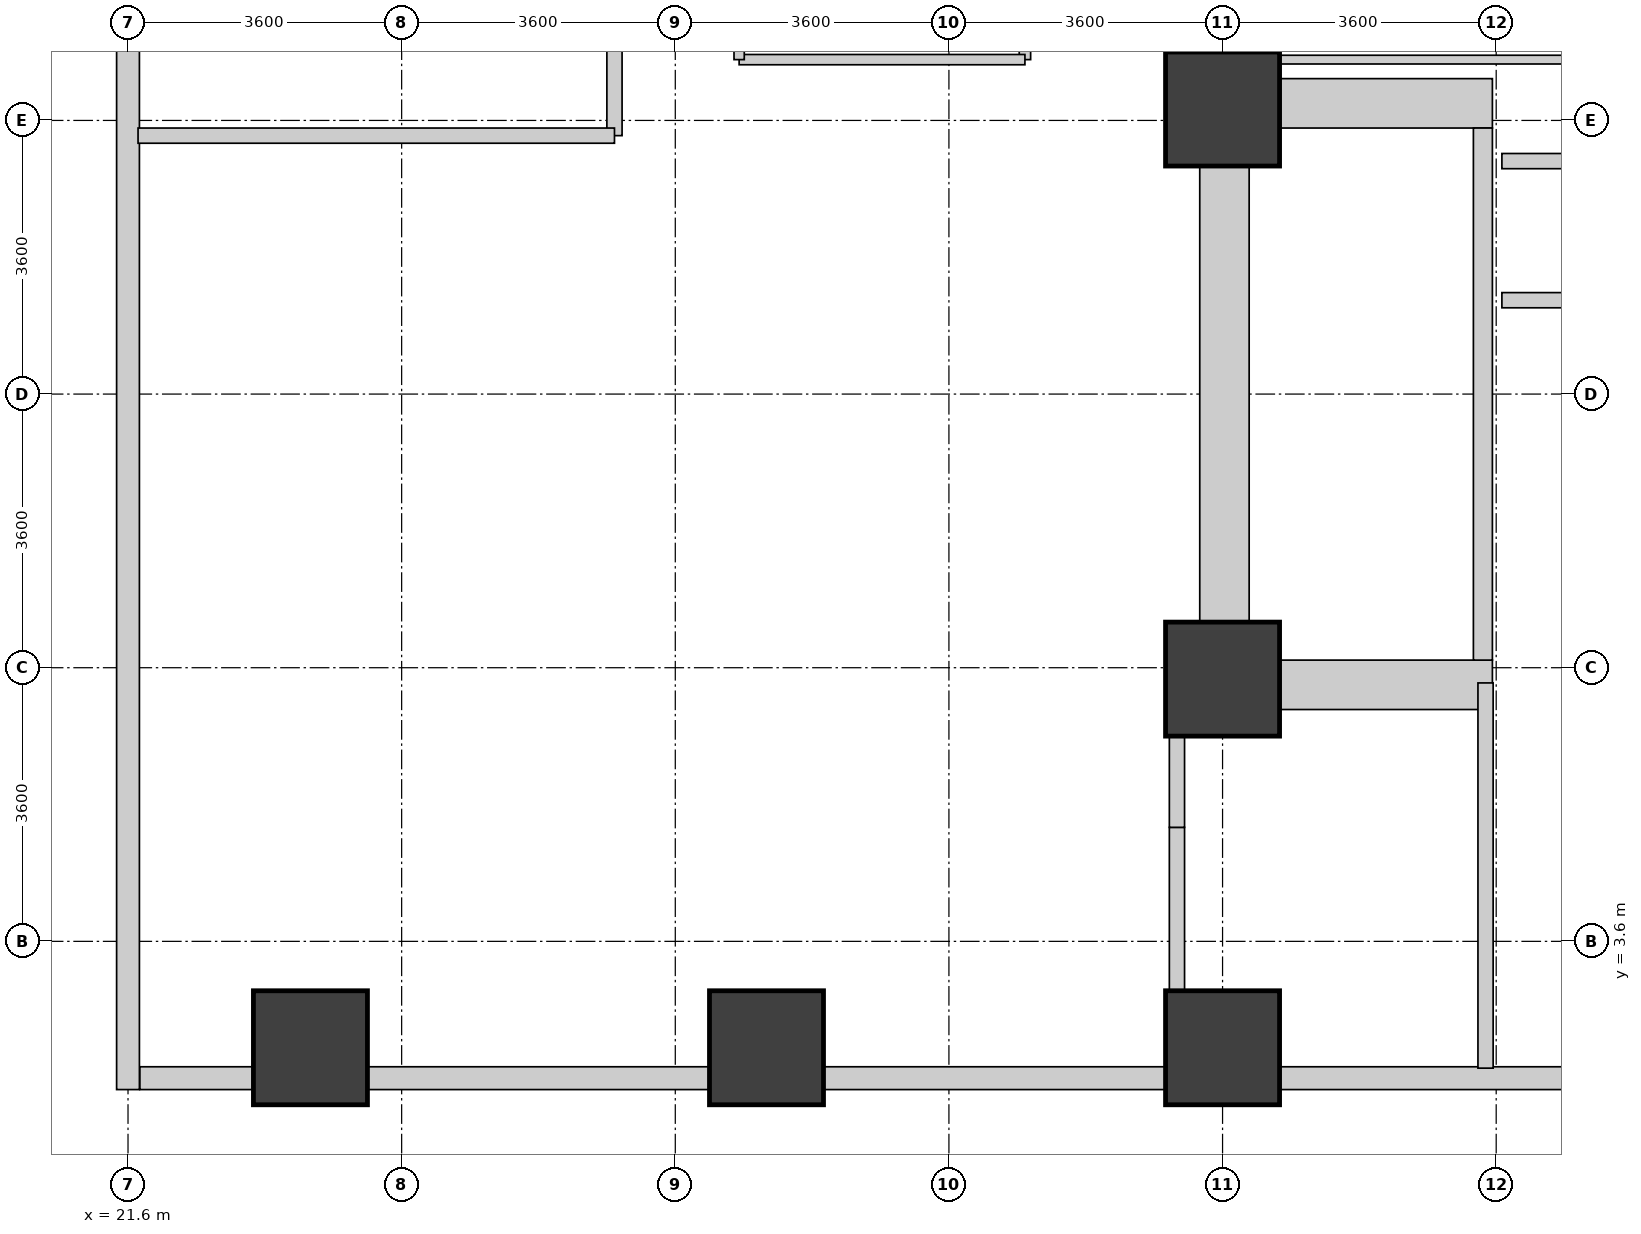
"""IFC4 building model, lengths in metres.
Left out: names, types, materials, properties, quantities, classifications, styles, units other than length and angle.
Written with IfcOpenShell. Run it as: python <this file> out.ifc"""

import sys

from ifc_helpers import new_model, si_unit, direction, frame, frame_2d, origin, origin_2d, place, context, subcontext, project, spatial, rectangle, extrude, source, transform, mapped, element, fill, save


model = new_model("IFC4")
c1 = context("Model", 3, precision=1e-05, world=origin(), true_north=direction((0.0, 1.0)))
c2 = subcontext(c1, "Body", "Model", "MODEL_VIEW")
j1 = project(units=[si_unit("LENGTHUNIT", "METRE"), si_unit("PLANEANGLEUNIT", "RADIAN")], contexts=[c1])
p1 = place(None, origin())
s1 = spatial("IfcSite", under=j1, at=p1, CompositionType="ELEMENT")
p2 = place(p1, origin())
s2 = spatial("IfcBuilding", under=s1, at=p2, CompositionType="ELEMENT")
p3 = place(p2, origin())
s3 = spatial("IfcBuildingStorey", under=s2, at=p3, CompositionType="ELEMENT", Elevation=0.0)
p4 = place(p3, frame((36.025, 6.65, 0.0), z_axis=(0.0, 0.0, 1.0), x_axis=(0.0, 1.0, 0.0)))
e1 = element("IfcWall", 1, at=p4, inside=s3, PredefinedType="SHEAR", context=c2, shape_type="SweptSolid", body=[
    extrude(rectangle(XDim=8.3, YDim=0.65, at=frame_2d((4.15, 0.0))), origin(), (0.0, 0.0, 1.0), 5.12),
])
p5 = place(p3, frame((36.35, 6.975, 0.0), z_axis=(0.0, 0.0, 1.0), x_axis=(1.0, 0.0, 0.0)))
e2 = element("IfcWall", 2, at=p5, inside=s3, PredefinedType="SHEAR", context=c2, shape_type="SweptSolid", body=[
    extrude(rectangle(XDim=3.2, YDim=0.65, at=frame_2d((1.6, 0.0))), origin(), (0.0, 0.0, 1.0), 5.12),
])
p6 = place(p5, frame((0.85, 0.0, 0.0)))
e3 = element("IfcOpeningElement", 3, at=p6, cuts=e2, PredefinedType="OPENING", context=c2, shape_type="SweptSolid", body=[
    extrude(rectangle(XDim=1.1, YDim=2.08, at=frame_2d((0.55, 1.04))), frame((0.0, 0.335, 0.0), z_axis=(0.0, -1.0, 0.0), x_axis=(1.0, 0.0, 0.0)), (0.0, 0.0, 1.0), 0.67),
])
p7 = place(p3, frame((36.35, 14.625, 0.0), z_axis=(0.0, 0.0, 1.0), x_axis=(1.0, 0.0, 0.0)))
e4 = element("IfcWall", 4, at=p7, inside=s3, PredefinedType="SHEAR", context=c2, shape_type="SweptSolid", body=[
    extrude(rectangle(XDim=3.2, YDim=0.65, at=frame_2d((1.6, 0.0))), origin(), (0.0, 0.0, 1.0), 5.12),
])
p8 = place(p3, frame((39.425, 7.3, 0.0), z_axis=(0.0, 0.0, 1.0), x_axis=(0.0, 1.0, 0.0)))
e5 = element("IfcWall", 5, at=p8, inside=s3, PredefinedType="SHEAR", context=c2, shape_type="SweptSolid", body=[
    extrude(rectangle(XDim=7.0, YDim=0.25, at=frame_2d((3.5, 0.0))), origin(), (0.0, 0.0, 1.0), 5.12),
])
p9 = place(p8, frame((0.15, 0.0, 0.0)))
e6 = element("IfcOpeningElement", 6, at=p9, cuts=e5, PredefinedType="OPENING", context=c2, shape_type="SweptSolid", body=[
    extrude(rectangle(XDim=1.1, YDim=2.08, at=frame_2d((0.55, 1.04))), frame((0.0, 0.135, 0.0), z_axis=(0.0, -1.0, 0.0), x_axis=(1.0, 0.0, 0.0)), (0.0, 0.0, 1.0), 0.27),
])
m1 = source(origin(), c2, "Body", "SweptSolid", [
    extrude(rectangle(XDim=1.5, YDim=1.5, at=origin_2d()), origin(), (0.0, 0.0, 1.0), 5.4),
])
for number, where, z_axis, x_axis in (
    (7, (36.0, 7.05, 0.0), (0.0, 0.0, 1.0), (1.0, 0.0, 0.0)),
    (8, (36.0, 14.55, 0.0), (0.0, 0.0, 1.0), (1.0, 0.0, 0.0)),
    (9, (36.0, 2.2, 0.0), (0.0, 0.0, 1.0), (1.0, 0.0, 0.0)),
    (10, (30.0, 2.2, 0.0), (0.0, 0.0, 1.0), (1.0, 0.0, 0.0)),
    (11, (24.0, 2.2, 0.0), (0.0, 0.0, 1.0), (1.0, 0.0, 0.0)),
):
    element("IfcColumn", number, at=place(p3, frame(where, z_axis=z_axis, x_axis=x_axis)), inside=s3, PredefinedType="COLUMN", context=c2, shape_type="MappedRepresentation", body=[
        mapped(m1, transform((0.0, 0.0, 0.0), x_axis=(1.0, 0.0, 0.0), y_axis=(0.0, 1.0, 0.0), z_axis=(0.0, 0.0, 1.0), scale=1.0)),
    ])
p10 = place(p3, frame((23.249, 1.8, 0.0), z_axis=(0.0, 0.0, 1.0), x_axis=(-1.0, 0.0, 0.0)))
e12 = element("IfcWall", 12, at=p10, inside=s3, PredefinedType="STANDARD", context=c2, shape_type="SweptSolid", body=[
    extrude(rectangle(XDim=1.494, YDim=0.3, at=frame_2d((0.747, 0.0))), origin(), (0.0, 0.0, 1.0), 5.1),
])
p11 = place(p3, frame((29.249, 1.8, 0.0), z_axis=(0.0, 0.0, 1.0), x_axis=(-1.0, 0.0, 0.0)))
e13 = element("IfcWall", 13, at=p11, inside=s3, PredefinedType="STANDARD", context=c2, shape_type="SweptSolid", body=[
    extrude(rectangle(XDim=4.498, YDim=0.3, at=frame_2d((2.249, 0.0))), origin(), (0.0, 0.0, 1.0), 5.1),
])
p12 = place(p11, frame((1.049, 0.0, 0.0)))
e14 = element("IfcOpeningElement", 14, at=p12, cuts=e13, PredefinedType="OPENING", context=c2, shape_type="SweptSolid", body=[
    extrude(rectangle(XDim=2.4, YDim=2.6, at=frame_2d((1.2, 1.3))), frame((0.0, 0.16, 0.0), z_axis=(0.0, -1.0, 0.0), x_axis=(1.0, 0.0, 0.0)), (0.0, 0.0, 1.0), 0.32),
])
p13 = place(p3, frame((35.249, 1.8, 0.0), z_axis=(0.0, 0.0, 1.0), x_axis=(-1.0, 0.0, 0.0)))
e15 = element("IfcWall", 15, at=p13, inside=s3, PredefinedType="STANDARD", context=c2, shape_type="SweptSolid", body=[
    extrude(rectangle(XDim=4.498, YDim=0.3, at=frame_2d((2.249, 0.0))), origin(), (0.0, 0.0, 1.0), 5.1),
])
p14 = place(p13, frame((1.049, 0.0, 0.9)))
e16 = element("IfcOpeningElement", 16, at=p14, cuts=e15, PredefinedType="OPENING", context=c2, shape_type="SweptSolid", body=[
    extrude(rectangle(XDim=2.4, YDim=2.5, at=frame_2d((1.2, 1.25))), frame((0.0, 0.16, 0.0), z_axis=(0.0, -1.0, 0.0), x_axis=(1.0, 0.0, 0.0)), (0.0, 0.0, 1.0), 0.32),
])
p15 = place(p3, frame((41.249, 1.8, 0.0), z_axis=(0.0, 0.0, 1.0), x_axis=(-1.0, 0.0, 0.0)))
e17 = element("IfcWall", 17, at=p15, inside=s3, PredefinedType="STANDARD", context=c2, shape_type="SweptSolid", body=[
    extrude(rectangle(XDim=4.498, YDim=0.3, at=frame_2d((2.249, 0.0))), origin(), (0.0, 0.0, 1.0), 5.1),
])
p16 = place(p15, frame((1.324, 0.0, 0.0)))
e18 = element("IfcOpeningElement", 18, at=p16, cuts=e17, PredefinedType="OPENING", context=c2, shape_type="SweptSolid", body=[
    extrude(rectangle(XDim=1.85, YDim=2.25, at=frame_2d((0.925, 1.125))), frame((0.0, 0.16, 0.0), z_axis=(0.0, -1.0, 0.0), x_axis=(1.0, 0.0, 0.0)), (0.0, 0.0, 1.0), 0.32),
])
p17 = place(p3, frame((21.6, 1.65, 0.0), z_axis=(0.0, 0.0, 1.0), x_axis=(0.0, 1.0, 0.0)))
e19 = element("IfcWall", 19, at=p17, inside=s3, PredefinedType="STANDARD", context=c2, shape_type="SweptSolid", body=[
    extrude(rectangle(XDim=16.5, YDim=0.3, at=frame_2d((8.25, 0.0))), origin(), (0.0, 0.0, 1.0), 5.1),
])
p18 = place(p17, frame((13.125, 0.0, 0.0)))
e20 = element("IfcOpeningElement", 20, at=p18, cuts=e19, PredefinedType="OPENING", context=c2, shape_type="SweptSolid", body=[
    extrude(rectangle(XDim=1.85, YDim=2.25, at=frame_2d((0.925, 1.125))), frame((0.0, 0.16, 0.0), z_axis=(0.0, -1.0, 0.0), x_axis=(1.0, 0.0, 0.0)), (0.0, 0.0, 1.0), 0.32),
])
p19 = place(p17, frame((0.45, 0.0, 0.9)))
e21 = element("IfcOpeningElement", 21, at=p19, cuts=e19, PredefinedType="OPENING", context=c2, shape_type="SweptSolid", body=[
    extrude(rectangle(XDim=2.4, YDim=2.5, at=frame_2d((1.2, 1.25))), frame((0.0, 0.16, 0.0), z_axis=(0.0, -1.0, 0.0), x_axis=(1.0, 0.0, 0.0)), (0.0, 0.0, 1.0), 0.32),
])
p20 = place(p17, frame((7.05, 0.0, 0.9)))
e22 = element("IfcOpeningElement", 22, at=p20, cuts=e19, PredefinedType="OPENING", context=c2, shape_type="SweptSolid", body=[
    extrude(rectangle(XDim=2.4, YDim=2.5, at=frame_2d((1.2, 1.25))), frame((0.0, 0.16, 0.0), z_axis=(0.0, -1.0, 0.0), x_axis=(1.0, 0.0, 0.0)), (0.0, 0.0, 1.0), 0.32),
])
p21 = place(p3, frame((39.675, 12.035, 0.0), z_axis=(0.0, 0.0, 1.0), x_axis=(1.0, 0.0, 0.0)))
e23 = element("IfcWall", 23, at=p21, inside=s3, PredefinedType="PARTITIONING", context=c2, shape_type="SweptSolid", body=[
    extrude(rectangle(XDim=1.55, YDim=0.2, at=frame_2d((0.775, 0.0))), origin(), (0.0, 0.0, 1.0), 5.1),
])
p22 = place(p21, frame((0.225, 0.0, 0.0)))
e24 = element("IfcOpeningElement", 24, at=p22, cuts=e23, PredefinedType="OPENING", context=c2, shape_type="SweptSolid", body=[
    extrude(rectangle(XDim=1.1, YDim=2.12, at=frame_2d((0.55, 1.06))), frame((0.0, 0.11, 0.0), z_axis=(0.0, -1.0, 0.0), x_axis=(1.0, 0.0, 0.0)), (0.0, 0.0, 1.0), 0.22),
])
p23 = place(p3, frame((39.675, 13.865, 0.0), z_axis=(0.0, 0.0, 1.0), x_axis=(1.0, 0.0, 0.0)))
e25 = element("IfcWall", 25, at=p23, inside=s3, PredefinedType="PARTITIONING", context=c2, shape_type="SweptSolid", body=[
    extrude(rectangle(XDim=1.55, YDim=0.2, at=frame_2d((0.775, 0.0))), origin(), (0.0, 0.0, 1.0), 5.1),
])
p24 = place(p3, frame((28.0, 14.2, 0.0), z_axis=(0.0, 0.0, 1.0), x_axis=(0.0, 1.0, 0.0)))
e26 = element("IfcWall", 26, at=p24, inside=s3, PredefinedType="PARTITIONING", context=c2, shape_type="SweptSolid", body=[
    extrude(rectangle(XDim=14.36, YDim=0.2, at=frame_2d((7.18, 0.0))), origin(), (0.0, 0.0, 1.0), 5.1),
])
p25 = place(p3, frame((21.732, 14.2, 0.0), z_axis=(0.0, 0.0, 1.0), x_axis=(1.0, 0.0, 0.0)))
e27 = element("IfcWall", 27, at=p25, inside=s3, PredefinedType="PARTITIONING", context=c2, shape_type="SweptSolid", body=[
    extrude(rectangle(XDim=6.268, YDim=0.2, at=frame_2d((3.134, 0.0))), origin(), (0.0, 0.0, 1.0), 5.1),
])
p26 = place(p3, frame((39.46, 1.932, 0.0), z_axis=(0.0, 0.0, 1.0), x_axis=(0.0, 1.0, 0.0)))
e28 = element("IfcWall", 28, at=p26, inside=s3, PredefinedType="PARTITIONING", context=c2, shape_type="SweptSolid", body=[
    extrude(rectangle(XDim=5.068, YDim=0.2, at=frame_2d((2.534, 0.0))), origin(), (0.0, 0.0, 1.0), 5.1),
])
p27 = place(p3, frame((35.4, 2.95, 0.0), z_axis=(0.0, 0.0, 1.0), x_axis=(0.0, 1.0, 0.0)))
e29 = element("IfcWall", 29, at=p27, inside=s3, PredefinedType="PARTITIONING", context=c2, shape_type="SweptSolid", body=[
    extrude(rectangle(XDim=2.15, YDim=0.2, at=frame_2d((1.075, 0.0))), origin(), (0.0, 0.0, 1.0), 5.1),
])
p28 = place(p3, frame((35.4, 5.1, 0.0), z_axis=(0.0, 0.0, 1.0), x_axis=(0.0, 1.0, 0.0)))
e30 = element("IfcWall", 30, at=p28, inside=s3, PredefinedType="PARTITIONING", context=c2, shape_type="SweptSolid", body=[
    extrude(rectangle(XDim=1.2, YDim=0.2, at=frame_2d((0.6, 0.0))), origin(), (0.0, 0.0, 1.0), 5.1),
])
p29 = place(p3, frame((35.4, 15.3, 0.0), z_axis=(0.0, 0.0, 1.0), x_axis=(0.0, 1.0, 0.0)))
e31 = element("IfcWall", 31, at=p29, inside=s3, PredefinedType="PARTITIONING", context=c2, shape_type="SweptSolid", body=[
    extrude(rectangle(XDim=5.55, YDim=0.15, at=frame_2d((2.775, 0.0))), origin(), (0.0, 0.0, 1.0), 5.1),
])
p30 = place(p29, frame((2.125, 0.0, 0.0)))
e32 = element("IfcOpeningElement", 32, at=p30, cuts=e31, PredefinedType="OPENING", context=c2, shape_type="SweptSolid", body=[
    extrude(rectangle(XDim=1.3, YDim=2.12, at=frame_2d((0.65, 1.06))), frame((0.0, 0.085, 0.0), z_axis=(0.0, -1.0, 0.0), x_axis=(1.0, 0.0, 0.0)), (0.0, 0.0, 1.0), 0.17),
])
p31 = place(p3, frame((33.4, 15.2, 0.0), z_axis=(0.0, 0.0, 1.0), x_axis=(0.0, 1.0, 0.0)))
e33 = element("IfcWall", 33, at=p31, inside=s3, PredefinedType="PARTITIONING", context=c2, shape_type="SweptSolid", body=[
    extrude(rectangle(XDim=3.4, YDim=0.15, at=frame_2d((1.7, 0.0))), origin(), (0.0, 0.0, 1.0), 5.1),
])
p32 = place(p31, frame((1.175, 0.0, 0.0)))
e34 = element("IfcOpeningElement", 34, at=p32, cuts=e33, PredefinedType="OPENING", context=c2, shape_type="SweptSolid", body=[
    extrude(rectangle(XDim=1.05, YDim=2.12, at=frame_2d((0.525, 1.06))), frame((0.0, 0.085, 0.0), z_axis=(0.0, -1.0, 0.0), x_axis=(1.0, 0.0, 0.0)), (0.0, 0.0, 1.0), 0.17),
])
p33 = place(p3, frame((36.75, 15.2, 0.0), z_axis=(0.0, 0.0, 1.0), x_axis=(1.0, 0.0, 0.0)))
e35 = element("IfcWall", 35, at=p33, inside=s3, PredefinedType="PARTITIONING", context=c2, shape_type="SweptSolid", body=[
    extrude(rectangle(XDim=5.7, YDim=0.115, at=frame_2d((2.85, 0.0))), origin(), (0.0, 0.0, 1.0), 5.1),
])
p34 = place(p3, frame((29.64, 15.2, 0.0), z_axis=(0.0, 0.0, 1.0), x_axis=(1.0, 0.0, 0.0)))
e36 = element("IfcWall", 36, at=p34, inside=s3, PredefinedType="PARTITIONING", context=c2, shape_type="SweptSolid", body=[
    extrude(rectangle(XDim=3.76, YDim=0.135, at=frame_2d((1.88, 0.0))), origin(), (0.0, 0.0, 1.0), 5.1),
])
p35 = place(p3, frame((29.64, 15.2, 0.0), z_axis=(0.0, 0.0, 1.0), x_axis=(0.0, 1.0, 0.0)))
e37 = element("IfcWall", 37, at=p35, inside=s3, PredefinedType="PARTITIONING", context=c2, shape_type="SweptSolid", body=[
    extrude(rectangle(XDim=3.4, YDim=0.135, at=frame_2d((1.7, 0.0))), origin(), (0.0, 0.0, 1.0), 5.1),
])
p36 = place(p12, origin())
e38 = element("IfcDoor", 38, at=p36, inside=s3, OperationType="DOUBLE_DOOR_SINGLE_SWING", PredefinedType="DOOR", context=c2, shape_type="SweptSolid", body=[
    extrude(rectangle(XDim=2.4, YDim=2.6, at=frame_2d((1.2, 1.3))), frame((0.0, 0.025, 0.0), z_axis=(0.0, -1.0, 0.0), x_axis=(1.0, 0.0, 0.0)), (0.0, 0.0, 1.0), 0.05),
])
fill(e14, e38)
p37 = place(p14, origin())
e39 = element("IfcWindow", 39, at=p37, inside=s3, PartitioningType="SINGLE_PANEL", PredefinedType="WINDOW", context=c2, shape_type="SweptSolid", body=[
    extrude(rectangle(XDim=2.4, YDim=2.5, at=frame_2d((1.2, 1.25))), frame((0.0, 0.03, 0.0), z_axis=(0.0, -1.0, 0.0), x_axis=(1.0, 0.0, 0.0)), (0.0, 0.0, 1.0), 0.06),
])
fill(e16, e39)
p38 = place(p16, origin())
e40 = element("IfcDoor", 40, at=p38, inside=s3, OperationType="DOUBLE_DOOR_SINGLE_SWING", PredefinedType="DOOR", context=c2, shape_type="SweptSolid", body=[
    extrude(rectangle(XDim=1.85, YDim=2.25, at=frame_2d((0.925, 1.125))), frame((0.0, 0.025, 0.0), z_axis=(0.0, -1.0, 0.0), x_axis=(1.0, 0.0, 0.0)), (0.0, 0.0, 1.0), 0.05),
])
fill(e18, e40)
p39 = place(p18, origin())
e41 = element("IfcDoor", 41, at=p39, inside=s3, OperationType="DOUBLE_DOOR_SINGLE_SWING", PredefinedType="DOOR", context=c2, shape_type="SweptSolid", body=[
    extrude(rectangle(XDim=1.85, YDim=2.25, at=frame_2d((0.925, 1.125))), frame((0.0, 0.025, 0.0), z_axis=(0.0, -1.0, 0.0), x_axis=(1.0, 0.0, 0.0)), (0.0, 0.0, 1.0), 0.05),
])
fill(e20, e41)
p40 = place(p19, origin())
e42 = element("IfcWindow", 42, at=p40, inside=s3, PartitioningType="SINGLE_PANEL", PredefinedType="WINDOW", context=c2, shape_type="SweptSolid", body=[
    extrude(rectangle(XDim=2.4, YDim=2.5, at=frame_2d((1.2, 1.25))), frame((0.0, 0.03, 0.0), z_axis=(0.0, -1.0, 0.0), x_axis=(1.0, 0.0, 0.0)), (0.0, 0.0, 1.0), 0.06),
])
fill(e21, e42)
p41 = place(p20, origin())
e43 = element("IfcWindow", 43, at=p41, inside=s3, PartitioningType="SINGLE_PANEL", PredefinedType="WINDOW", context=c2, shape_type="SweptSolid", body=[
    extrude(rectangle(XDim=2.4, YDim=2.5, at=frame_2d((1.2, 1.25))), frame((0.0, 0.03, 0.0), z_axis=(0.0, -1.0, 0.0), x_axis=(1.0, 0.0, 0.0)), (0.0, 0.0, 1.0), 0.06),
])
fill(e22, e43)
p42 = place(p9, origin())
e44 = element("IfcDoor", 44, at=p42, inside=s3, OperationType="SINGLE_SWING_RIGHT", PredefinedType="DOOR", context=c2, shape_type="SweptSolid", body=[
    extrude(rectangle(XDim=1.1, YDim=2.08, at=frame_2d((0.55, 1.04))), frame((0.0, 0.025, 0.0), z_axis=(0.0, -1.0, 0.0), x_axis=(1.0, 0.0, 0.0)), (0.0, 0.0, 1.0), 0.05),
])
fill(e6, e44)
p43 = place(p6, origin())
e45 = element("IfcDoor", 45, at=p43, inside=s3, OperationType="SINGLE_SWING_LEFT", PredefinedType="DOOR", context=c2, shape_type="SweptSolid", body=[
    extrude(rectangle(XDim=1.1, YDim=2.08, at=frame_2d((0.55, 1.04))), frame((0.0, 0.025, 0.0), z_axis=(0.0, -1.0, 0.0), x_axis=(1.0, 0.0, 0.0)), (0.0, 0.0, 1.0), 0.05),
])
fill(e3, e45)
p44 = place(p22, origin())
e46 = element("IfcDoor", 46, at=p44, inside=s3, OperationType="SLIDING_TO_LEFT", PredefinedType="DOOR", context=c2, shape_type="SweptSolid", body=[
    extrude(rectangle(XDim=1.1, YDim=2.12, at=frame_2d((0.55, 1.06))), frame((0.0, 0.025, 0.0), z_axis=(0.0, -1.0, 0.0), x_axis=(1.0, 0.0, 0.0)), (0.0, 0.0, 1.0), 0.05),
])
fill(e24, e46)
save(model, sys.argv[1])
